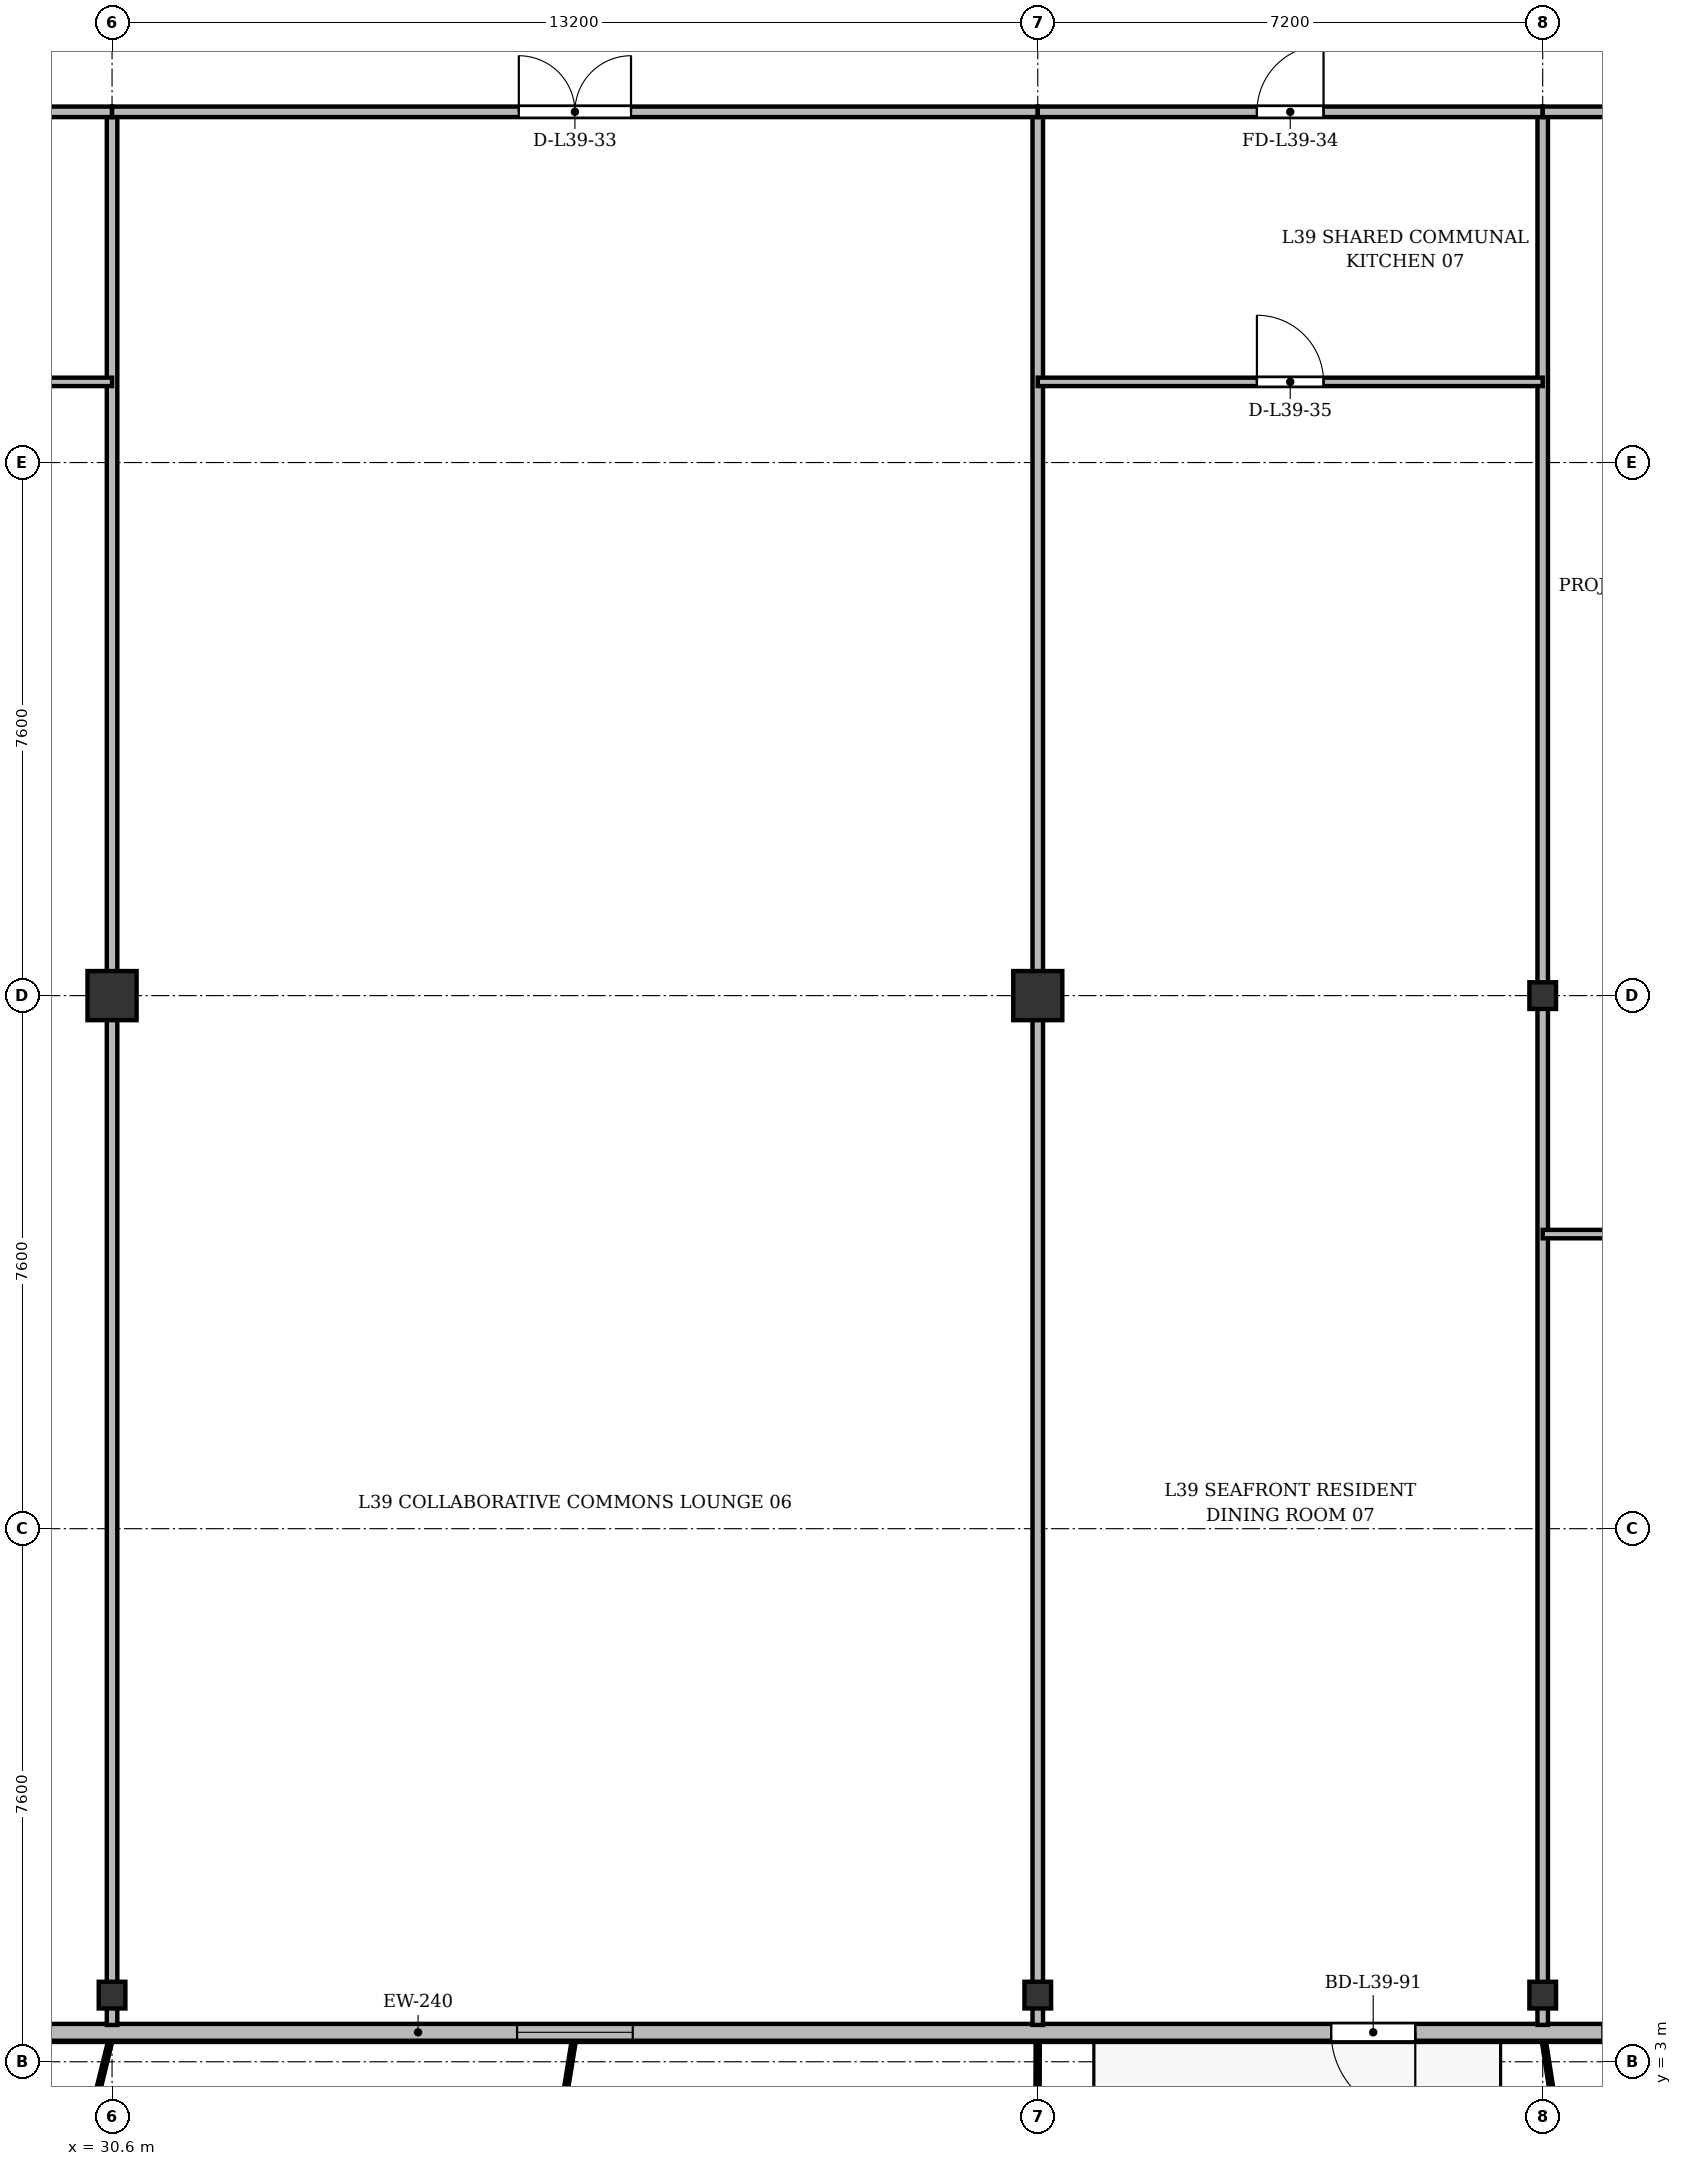
"""IFC4 building model, lengths in metres.
Left out: names, types, materials, properties, quantities, classifications, styles, units other than length and angle.
Written with IfcOpenShell. Run it as: python <this file> out.ifc"""

import sys

from ifc_helpers import new_model, si_unit, direction, frame, frame_2d, origin, origin_2d, place, context, subcontext, project, spatial, rectangle, i_section, extrude, source, transform, mapped, element, fill, save


model = new_model("IFC4")
c1 = context("Model", 3, precision=1e-05, world=origin(), true_north=direction((0.0, 1.0)))
c2 = subcontext(c1, "Body", "Model", "MODEL_VIEW")
j1 = project(units=[si_unit("LENGTHUNIT", "METRE"), si_unit("PLANEANGLEUNIT", "RADIAN")], contexts=[c1])
p1 = place(None, origin())
s1 = spatial("IfcSite", under=j1, at=p1, CompositionType="ELEMENT")
p2 = place(p1, origin())
s2 = spatial("IfcBuilding", under=s1, at=p2, CompositionType="ELEMENT")
p3 = place(p2, frame((0.0, 0.0, 150.1)))
s3 = spatial("IfcBuildingStorey", under=s2, at=p3, CompositionType="ELEMENT", Elevation=150.1)
m1 = source(origin(), c2, "Body", "SweptSolid", [
    extrude(i_section(OverallWidth=0.38, OverallDepth=0.38, WebThickness=0.02, FlangeThickness=0.03, at=origin_2d()), origin(), (0.0, 0.0, 1.0), 3.6),
])
p4 = place(p3, frame((30.6, 3.95, 0.0), z_axis=(0.0, 0.0, 1.0), x_axis=(1.0, 0.0, 0.0)))
e1 = element("IfcColumn", 1, at=p4, inside=s3, PredefinedType="COLUMN", context=c2, shape_type="MappedRepresentation", body=[
    mapped(m1, transform((0.0, 0.0, 0.0), x_axis=(1.0, 0.0, 0.0), y_axis=(0.0, 1.0, 0.0), z_axis=(0.0, 0.0, 1.0), scale=1.0)),
])
m2 = source(origin(), c2, "Body", "SweptSolid", [
    extrude(rectangle(XDim=0.7, YDim=0.7, at=origin_2d()), origin(), (0.0, 0.0, 1.0), 3.6),
])
p5 = place(p3, frame((30.6, 18.2, 0.0), z_axis=(0.0, 0.0, 1.0), x_axis=(1.0, 0.0, 0.0)))
e2 = element("IfcColumn", 2, at=p5, inside=s3, PredefinedType="COLUMN", context=c2, shape_type="MappedRepresentation", body=[
    mapped(m2, transform((0.0, 0.0, 0.0), x_axis=(1.0, 0.0, 0.0), y_axis=(0.0, 1.0, 0.0), z_axis=(0.0, 0.0, 1.0), scale=1.0)),
])
p6 = place(p3, frame((43.8, 3.95, 0.0), z_axis=(0.0, 0.0, 1.0), x_axis=(1.0, 0.0, 0.0)))
e3 = element("IfcColumn", 3, at=p6, inside=s3, PredefinedType="COLUMN", context=c2, shape_type="MappedRepresentation", body=[
    mapped(m1, transform((0.0, 0.0, 0.0), x_axis=(1.0, 0.0, 0.0), y_axis=(0.0, 1.0, 0.0), z_axis=(0.0, 0.0, 1.0), scale=1.0)),
])
p7 = place(p3, frame((43.8, 18.2, 0.0), z_axis=(0.0, 0.0, 1.0), x_axis=(1.0, 0.0, 0.0)))
e4 = element("IfcColumn", 4, at=p7, inside=s3, PredefinedType="COLUMN", context=c2, shape_type="MappedRepresentation", body=[
    mapped(m2, transform((0.0, 0.0, 0.0), x_axis=(1.0, 0.0, 0.0), y_axis=(0.0, 1.0, 0.0), z_axis=(0.0, 0.0, 1.0), scale=1.0)),
])
for number, where, z_axis, x_axis in (
    (5, (51.0, 3.95, 0.0), (0.0, 0.0, 1.0), (1.0, 0.0, 0.0)),
    (6, (51.0, 18.2, 0.0), (0.0, 0.0, 1.0), (1.0, 0.0, 0.0)),
):
    element("IfcColumn", number, at=place(p3, frame(where, z_axis=z_axis, x_axis=x_axis)), inside=s3, PredefinedType="COLUMN", context=c2, shape_type="MappedRepresentation", body=[
        mapped(m1, transform((0.0, 0.0, 0.0), x_axis=(1.0, 0.0, 0.0), y_axis=(0.0, 1.0, 0.0), z_axis=(0.0, 0.0, 1.0), scale=1.0)),
    ])
p8 = place(p3, frame((63.6, 3.42, 0.0), z_axis=(0.0, 0.0, 1.0), x_axis=(-1.0, 0.0, 0.0)))
e7 = element("IfcWall", 7, at=p8, inside=s3, PredefinedType="SOLIDWALL", context=c2, shape_type="SweptSolid", body=[
    extrude(rectangle(XDim=52.8, YDim=0.24, at=frame_2d((26.4, 0.0))), origin(), (0.0, 0.0, 1.0), 3.35),
])
p9 = place(p8, frame((1.62, 0.0, 0.9)))
e8 = element("IfcOpeningElement", 8, at=p9, cuts=e7, PredefinedType="OPENING", context=c2, shape_type="SweptSolid", body=[
    extrude(rectangle(XDim=1.65, YDim=1.85, at=frame_2d((0.825, 0.925))), frame((0.0, 0.13, 0.0), z_axis=(0.0, -1.0, 0.0), x_axis=(1.0, 0.0, 0.0)), (0.0, 0.0, 1.0), 0.26),
])
p10 = place(p8, frame((5.2, 0.0, 0.9)))
e9 = element("IfcOpeningElement", 9, at=p10, cuts=e7, PredefinedType="OPENING", context=c2, shape_type="SweptSolid", body=[
    extrude(rectangle(XDim=1.8, YDim=1.8, at=frame_2d((0.9, 0.9))), frame((0.0, 0.13, 0.0), z_axis=(0.0, -1.0, 0.0), x_axis=(1.0, 0.0, 0.0)), (0.0, 0.0, 1.0), 0.26),
])
p11 = place(p8, frame((7.65, 0.0, 0.9)))
e10 = element("IfcOpeningElement", 10, at=p11, cuts=e7, PredefinedType="OPENING", context=c2, shape_type="SweptSolid", body=[
    extrude(rectangle(XDim=1.5, YDim=1.75, at=frame_2d((0.75, 0.875))), frame((0.0, 0.13, 0.0), z_axis=(0.0, -1.0, 0.0), x_axis=(1.0, 0.0, 0.0)), (0.0, 0.0, 1.0), 0.26),
])
p12 = place(p8, frame((10.25, 0.0, 0.9)))
e11 = element("IfcOpeningElement", 11, at=p12, cuts=e7, PredefinedType="OPENING", context=c2, shape_type="SweptSolid", body=[
    extrude(rectangle(XDim=1.5, YDim=1.75, at=frame_2d((0.75, 0.875))), frame((0.0, 0.13, 0.0), z_axis=(0.0, -1.0, 0.0), x_axis=(1.0, 0.0, 0.0)), (0.0, 0.0, 1.0), 0.26),
])
p13 = place(p8, frame((14.417, 0.0, 0.0)))
e12 = element("IfcOpeningElement", 12, at=p13, cuts=e7, PredefinedType="OPENING", context=c2, shape_type="SweptSolid", body=[
    extrude(rectangle(XDim=1.2, YDim=2.2, at=frame_2d((0.6, 1.1))), frame((0.0, 0.13, 0.0), z_axis=(0.0, -1.0, 0.0), x_axis=(1.0, 0.0, 0.0)), (0.0, 0.0, 1.0), 0.26),
])
p14 = place(p8, frame((25.575, 0.0, 0.9)))
e13 = element("IfcOpeningElement", 13, at=p14, cuts=e7, PredefinedType="OPENING", context=c2, shape_type="SweptSolid", body=[
    extrude(rectangle(XDim=1.65, YDim=1.85, at=frame_2d((0.825, 0.925))), frame((0.0, 0.13, 0.0), z_axis=(0.0, -1.0, 0.0), x_axis=(1.0, 0.0, 0.0)), (0.0, 0.0, 1.0), 0.26),
])
p15 = place(p8, frame((35.7, 0.0, 0.9)))
e14 = element("IfcOpeningElement", 14, at=p15, cuts=e7, PredefinedType="OPENING", context=c2, shape_type="SweptSolid", body=[
    extrude(rectangle(XDim=1.8, YDim=1.8, at=frame_2d((0.9, 0.9))), frame((0.0, 0.13, 0.0), z_axis=(0.0, -1.0, 0.0), x_axis=(1.0, 0.0, 0.0)), (0.0, 0.0, 1.0), 0.26),
])
p16 = place(p8, frame((41.656, 0.0, 0.0)))
e15 = element("IfcOpeningElement", 15, at=p16, cuts=e7, PredefinedType="OPENING", context=c2, shape_type="SweptSolid", body=[
    extrude(rectangle(XDim=1.2, YDim=2.2, at=frame_2d((0.6, 1.1))), frame((0.0, 0.13, 0.0), z_axis=(0.0, -1.0, 0.0), x_axis=(1.0, 0.0, 0.0)), (0.0, 0.0, 1.0), 0.26),
])
p17 = place(p8, frame((43.65, 0.0, 0.9)))
e16 = element("IfcOpeningElement", 16, at=p17, cuts=e7, PredefinedType="OPENING", context=c2, shape_type="SweptSolid", body=[
    extrude(rectangle(XDim=1.5, YDim=1.75, at=frame_2d((0.75, 0.875))), frame((0.0, 0.13, 0.0), z_axis=(0.0, -1.0, 0.0), x_axis=(1.0, 0.0, 0.0)), (0.0, 0.0, 1.0), 0.26),
])
p18 = place(p8, frame((45.7, 0.0, 0.9)))
e17 = element("IfcOpeningElement", 17, at=p18, cuts=e7, PredefinedType="OPENING", context=c2, shape_type="SweptSolid", body=[
    extrude(rectangle(XDim=2.0, YDim=1.95, at=frame_2d((1.0, 0.975))), frame((0.0, 0.13, 0.0), z_axis=(0.0, -1.0, 0.0), x_axis=(1.0, 0.0, 0.0)), (0.0, 0.0, 1.0), 0.26),
])
p19 = place(p8, frame((49.53, 0.0, 0.9)))
e18 = element("IfcOpeningElement", 18, at=p19, cuts=e7, PredefinedType="OPENING", context=c2, shape_type="SweptSolid", body=[
    extrude(rectangle(XDim=1.65, YDim=1.85, at=frame_2d((0.825, 0.925))), frame((0.0, 0.13, 0.0), z_axis=(0.0, -1.0, 0.0), x_axis=(1.0, 0.0, 0.0)), (0.0, 0.0, 1.0), 0.26),
])
for number, where, z_axis, x_axis in (
    (19, (30.6, 3.525, 0.0), (0.0, 0.0, 1.0), (0.0, 1.0, 0.0)),
    (20, (43.8, 3.525, 0.0), (0.0, 0.0, 1.0), (0.0, 1.0, 0.0)),
    (21, (51.0, 3.525, 0.0), (0.0, 0.0, 1.0), (0.0, 1.0, 0.0)),
):
    element("IfcWall", number, at=place(p3, frame(where, z_axis=z_axis, x_axis=x_axis)), inside=s3, PredefinedType="PARTITIONING", context=c2, shape_type="SweptSolid", body=[
        extrude(rectangle(XDim=27.275, YDim=0.15, at=frame_2d((13.638, 0.0))), origin(), (0.0, 0.0, 1.0), 2.85),
    ])
p20 = place(p3, frame((23.4, 30.8, 0.0), z_axis=(0.0, 0.0, 1.0), x_axis=(1.0, 0.0, 0.0)))
e22 = element("IfcWall", 22, at=p20, inside=s3, PredefinedType="PARTITIONING", context=c2, shape_type="SweptSolid", body=[
    extrude(rectangle(XDim=7.2, YDim=0.15, at=frame_2d((3.6, 0.0))), origin(), (0.0, 0.0, 1.0), 2.85),
])
p21 = place(p20, frame((3.125, 0.0, 0.0)))
e23 = element("IfcOpeningElement", 23, at=p21, cuts=e22, PredefinedType="OPENING", context=c2, shape_type="SweptSolid", body=[
    extrude(rectangle(XDim=0.95, YDim=2.15, at=frame_2d((0.475, 1.075))), frame((0.0, 0.085, 0.0), z_axis=(0.0, -1.0, 0.0), x_axis=(1.0, 0.0, 0.0)), (0.0, 0.0, 1.0), 0.17),
])
p22 = place(p3, frame((23.4, 26.95, 0.0), z_axis=(0.0, 0.0, 1.0), x_axis=(1.0, 0.0, 0.0)))
e24 = element("IfcWall", 24, at=p22, inside=s3, PredefinedType="PARTITIONING", context=c2, shape_type="SweptSolid", body=[
    extrude(rectangle(XDim=7.2, YDim=0.12, at=frame_2d((3.6, 0.0))), origin(), (0.0, 0.0, 1.0), 2.85),
])
p23 = place(p22, frame((3.125, 0.0, 0.0)))
e25 = element("IfcOpeningElement", 25, at=p23, cuts=e24, PredefinedType="OPENING", context=c2, shape_type="SweptSolid", body=[
    extrude(rectangle(XDim=0.95, YDim=2.15, at=frame_2d((0.475, 1.075))), frame((0.0, 0.07, 0.0), z_axis=(0.0, -1.0, 0.0), x_axis=(1.0, 0.0, 0.0)), (0.0, 0.0, 1.0), 0.14),
])
p24 = place(p3, frame((30.6, 30.8, 0.0), z_axis=(0.0, 0.0, 1.0), x_axis=(1.0, 0.0, 0.0)))
e26 = element("IfcWall", 26, at=p24, inside=s3, PredefinedType="PARTITIONING", context=c2, shape_type="SweptSolid", body=[
    extrude(rectangle(XDim=13.2, YDim=0.15, at=frame_2d((6.6, 0.0))), origin(), (0.0, 0.0, 1.0), 2.85),
])
p25 = place(p24, frame((5.8, 0.0, 0.0)))
e27 = element("IfcOpeningElement", 27, at=p25, cuts=e26, PredefinedType="OPENING", context=c2, shape_type="SweptSolid", body=[
    extrude(rectangle(XDim=1.6, YDim=2.2, at=frame_2d((0.8, 1.1))), frame((0.0, 0.085, 0.0), z_axis=(0.0, -1.0, 0.0), x_axis=(1.0, 0.0, 0.0)), (0.0, 0.0, 1.0), 0.17),
])
p26 = place(p3, frame((43.8, 30.8, 0.0), z_axis=(0.0, 0.0, 1.0), x_axis=(1.0, 0.0, 0.0)))
e28 = element("IfcWall", 28, at=p26, inside=s3, PredefinedType="PARTITIONING", context=c2, shape_type="SweptSolid", body=[
    extrude(rectangle(XDim=7.2, YDim=0.15, at=frame_2d((3.6, 0.0))), origin(), (0.0, 0.0, 1.0), 2.85),
])
p27 = place(p26, frame((3.125, 0.0, 0.0)))
e29 = element("IfcOpeningElement", 29, at=p27, cuts=e28, PredefinedType="OPENING", context=c2, shape_type="SweptSolid", body=[
    extrude(rectangle(XDim=0.95, YDim=2.15, at=frame_2d((0.475, 1.075))), frame((0.0, 0.085, 0.0), z_axis=(0.0, -1.0, 0.0), x_axis=(1.0, 0.0, 0.0)), (0.0, 0.0, 1.0), 0.17),
])
p28 = place(p3, frame((43.8, 26.95, 0.0), z_axis=(0.0, 0.0, 1.0), x_axis=(1.0, 0.0, 0.0)))
e30 = element("IfcWall", 30, at=p28, inside=s3, PredefinedType="PARTITIONING", context=c2, shape_type="SweptSolid", body=[
    extrude(rectangle(XDim=7.2, YDim=0.12, at=frame_2d((3.6, 0.0))), origin(), (0.0, 0.0, 1.0), 2.85),
])
p29 = place(p28, frame((3.125, 0.0, 0.0)))
e31 = element("IfcOpeningElement", 31, at=p29, cuts=e30, PredefinedType="OPENING", context=c2, shape_type="SweptSolid", body=[
    extrude(rectangle(XDim=0.95, YDim=2.15, at=frame_2d((0.475, 1.075))), frame((0.0, 0.07, 0.0), z_axis=(0.0, -1.0, 0.0), x_axis=(1.0, 0.0, 0.0)), (0.0, 0.0, 1.0), 0.14),
])
p30 = place(p3, frame((51.0, 30.8, 0.0), z_axis=(0.0, 0.0, 1.0), x_axis=(1.0, 0.0, 0.0)))
e32 = element("IfcWall", 32, at=p30, inside=s3, PredefinedType="PARTITIONING", context=c2, shape_type="SweptSolid", body=[
    extrude(rectangle(XDim=3.2, YDim=0.15, at=frame_2d((1.6, 0.0))), origin(), (0.0, 0.0, 1.0), 2.85),
])
p31 = place(p30, frame((1.125, 0.0, 0.0)))
e33 = element("IfcOpeningElement", 33, at=p31, cuts=e32, PredefinedType="OPENING", context=c2, shape_type="SweptSolid", body=[
    extrude(rectangle(XDim=0.95, YDim=2.15, at=frame_2d((0.475, 1.075))), frame((0.0, 0.085, 0.0), z_axis=(0.0, -1.0, 0.0), x_axis=(1.0, 0.0, 0.0)), (0.0, 0.0, 1.0), 0.17),
])
p32 = place(p3, frame((51.0, 14.8, 0.0), z_axis=(0.0, 0.0, 1.0), x_axis=(1.0, 0.0, 0.0)))
e34 = element("IfcWall", 34, at=p32, inside=s3, PredefinedType="PARTITIONING", context=c2, shape_type="SweptSolid", body=[
    extrude(rectangle(XDim=3.2, YDim=0.12, at=frame_2d((1.6, 0.0))), origin(), (0.0, 0.0, 1.0), 2.85),
])
p33 = place(p32, frame((1.125, 0.0, 0.0)))
e35 = element("IfcOpeningElement", 35, at=p33, cuts=e34, PredefinedType="OPENING", context=c2, shape_type="SweptSolid", body=[
    extrude(rectangle(XDim=0.95, YDim=2.15, at=frame_2d((0.475, 1.075))), frame((0.0, 0.07, 0.0), z_axis=(0.0, -1.0, 0.0), x_axis=(1.0, 0.0, 0.0)), (0.0, 0.0, 1.0), 0.14),
])
m3 = source(origin(), c2, "Body", "SweptSolid", [
    extrude(rectangle(XDim=1.2, YDim=2.2, at=frame_2d((0.6, 1.1))), frame((0.0, 0.025, 0.0), z_axis=(0.0, -1.0, 0.0), x_axis=(1.0, 0.0, 0.0)), (0.0, 0.0, 1.0), 0.05),
])
p34 = place(p13, origin())
e36 = element("IfcDoor", 36, at=p34, inside=s3, OperationType="SINGLE_SWING_LEFT", PredefinedType="DOOR", context=c2, shape_type="MappedRepresentation", body=[
    mapped(m3, transform((0.0, 0.0, 0.0), x_axis=(1.0, 0.0, 0.0), y_axis=(0.0, 1.0, 0.0), z_axis=(0.0, 0.0, 1.0), scale=1.0)),
])
fill(e12, e36)
m4 = source(origin(), c2, "Body", "SweptSolid", [
    extrude(rectangle(XDim=1.65, YDim=1.85, at=frame_2d((0.825, 0.925))), frame((0.0, 0.03, 0.0), z_axis=(0.0, -1.0, 0.0), x_axis=(1.0, 0.0, 0.0)), (0.0, 0.0, 1.0), 0.06),
])
p35 = place(p14, origin())
e37 = element("IfcWindow", 37, at=p35, inside=s3, PartitioningType="SINGLE_PANEL", PredefinedType="WINDOW", context=c2, shape_type="MappedRepresentation", body=[
    mapped(m4, transform((0.0, 0.0, 0.0), x_axis=(1.0, 0.0, 0.0), y_axis=(0.0, 1.0, 0.0), z_axis=(0.0, 0.0, 1.0), scale=1.0)),
])
fill(e13, e37)
m5 = source(origin(), c2, "Body", "SweptSolid", [
    extrude(rectangle(XDim=1.6, YDim=2.2, at=frame_2d((0.8, 1.1))), frame((0.0, 0.025, 0.0), z_axis=(0.0, -1.0, 0.0), x_axis=(1.0, 0.0, 0.0)), (0.0, 0.0, 1.0), 0.05),
])
p36 = place(p25, origin())
e38 = element("IfcDoor", 38, at=p36, inside=s3, OperationType="DOUBLE_DOOR_SINGLE_SWING", PredefinedType="DOOR", context=c2, shape_type="MappedRepresentation", body=[
    mapped(m5, transform((0.0, 0.0, 0.0), x_axis=(1.0, 0.0, 0.0), y_axis=(0.0, 1.0, 0.0), z_axis=(0.0, 0.0, 1.0), scale=1.0)),
])
fill(e27, e38)
m6 = source(origin(), c2, "Body", "SweptSolid", [
    extrude(rectangle(XDim=0.95, YDim=2.15, at=frame_2d((0.475, 1.075))), frame((0.0, 0.025, 0.0), z_axis=(0.0, -1.0, 0.0), x_axis=(1.0, 0.0, 0.0)), (0.0, 0.0, 1.0), 0.05),
])
p37 = place(p27, origin())
e39 = element("IfcDoor", 39, at=p37, inside=s3, OperationType="SINGLE_SWING_RIGHT", PredefinedType="DOOR", context=c2, shape_type="MappedRepresentation", body=[
    mapped(m6, transform((0.0, 0.0, 0.0), x_axis=(1.0, 0.0, 0.0), y_axis=(0.0, 1.0, 0.0), z_axis=(0.0, 0.0, 1.0), scale=1.0)),
])
fill(e29, e39)
p38 = place(p29, origin())
e40 = element("IfcDoor", 40, at=p38, inside=s3, OperationType="SINGLE_SWING_LEFT", PredefinedType="DOOR", context=c2, shape_type="MappedRepresentation", body=[
    mapped(m6, transform((0.0, 0.0, 0.0), x_axis=(1.0, 0.0, 0.0), y_axis=(0.0, 1.0, 0.0), z_axis=(0.0, 0.0, 1.0), scale=1.0)),
])
fill(e31, e40)
save(model, sys.argv[1])
